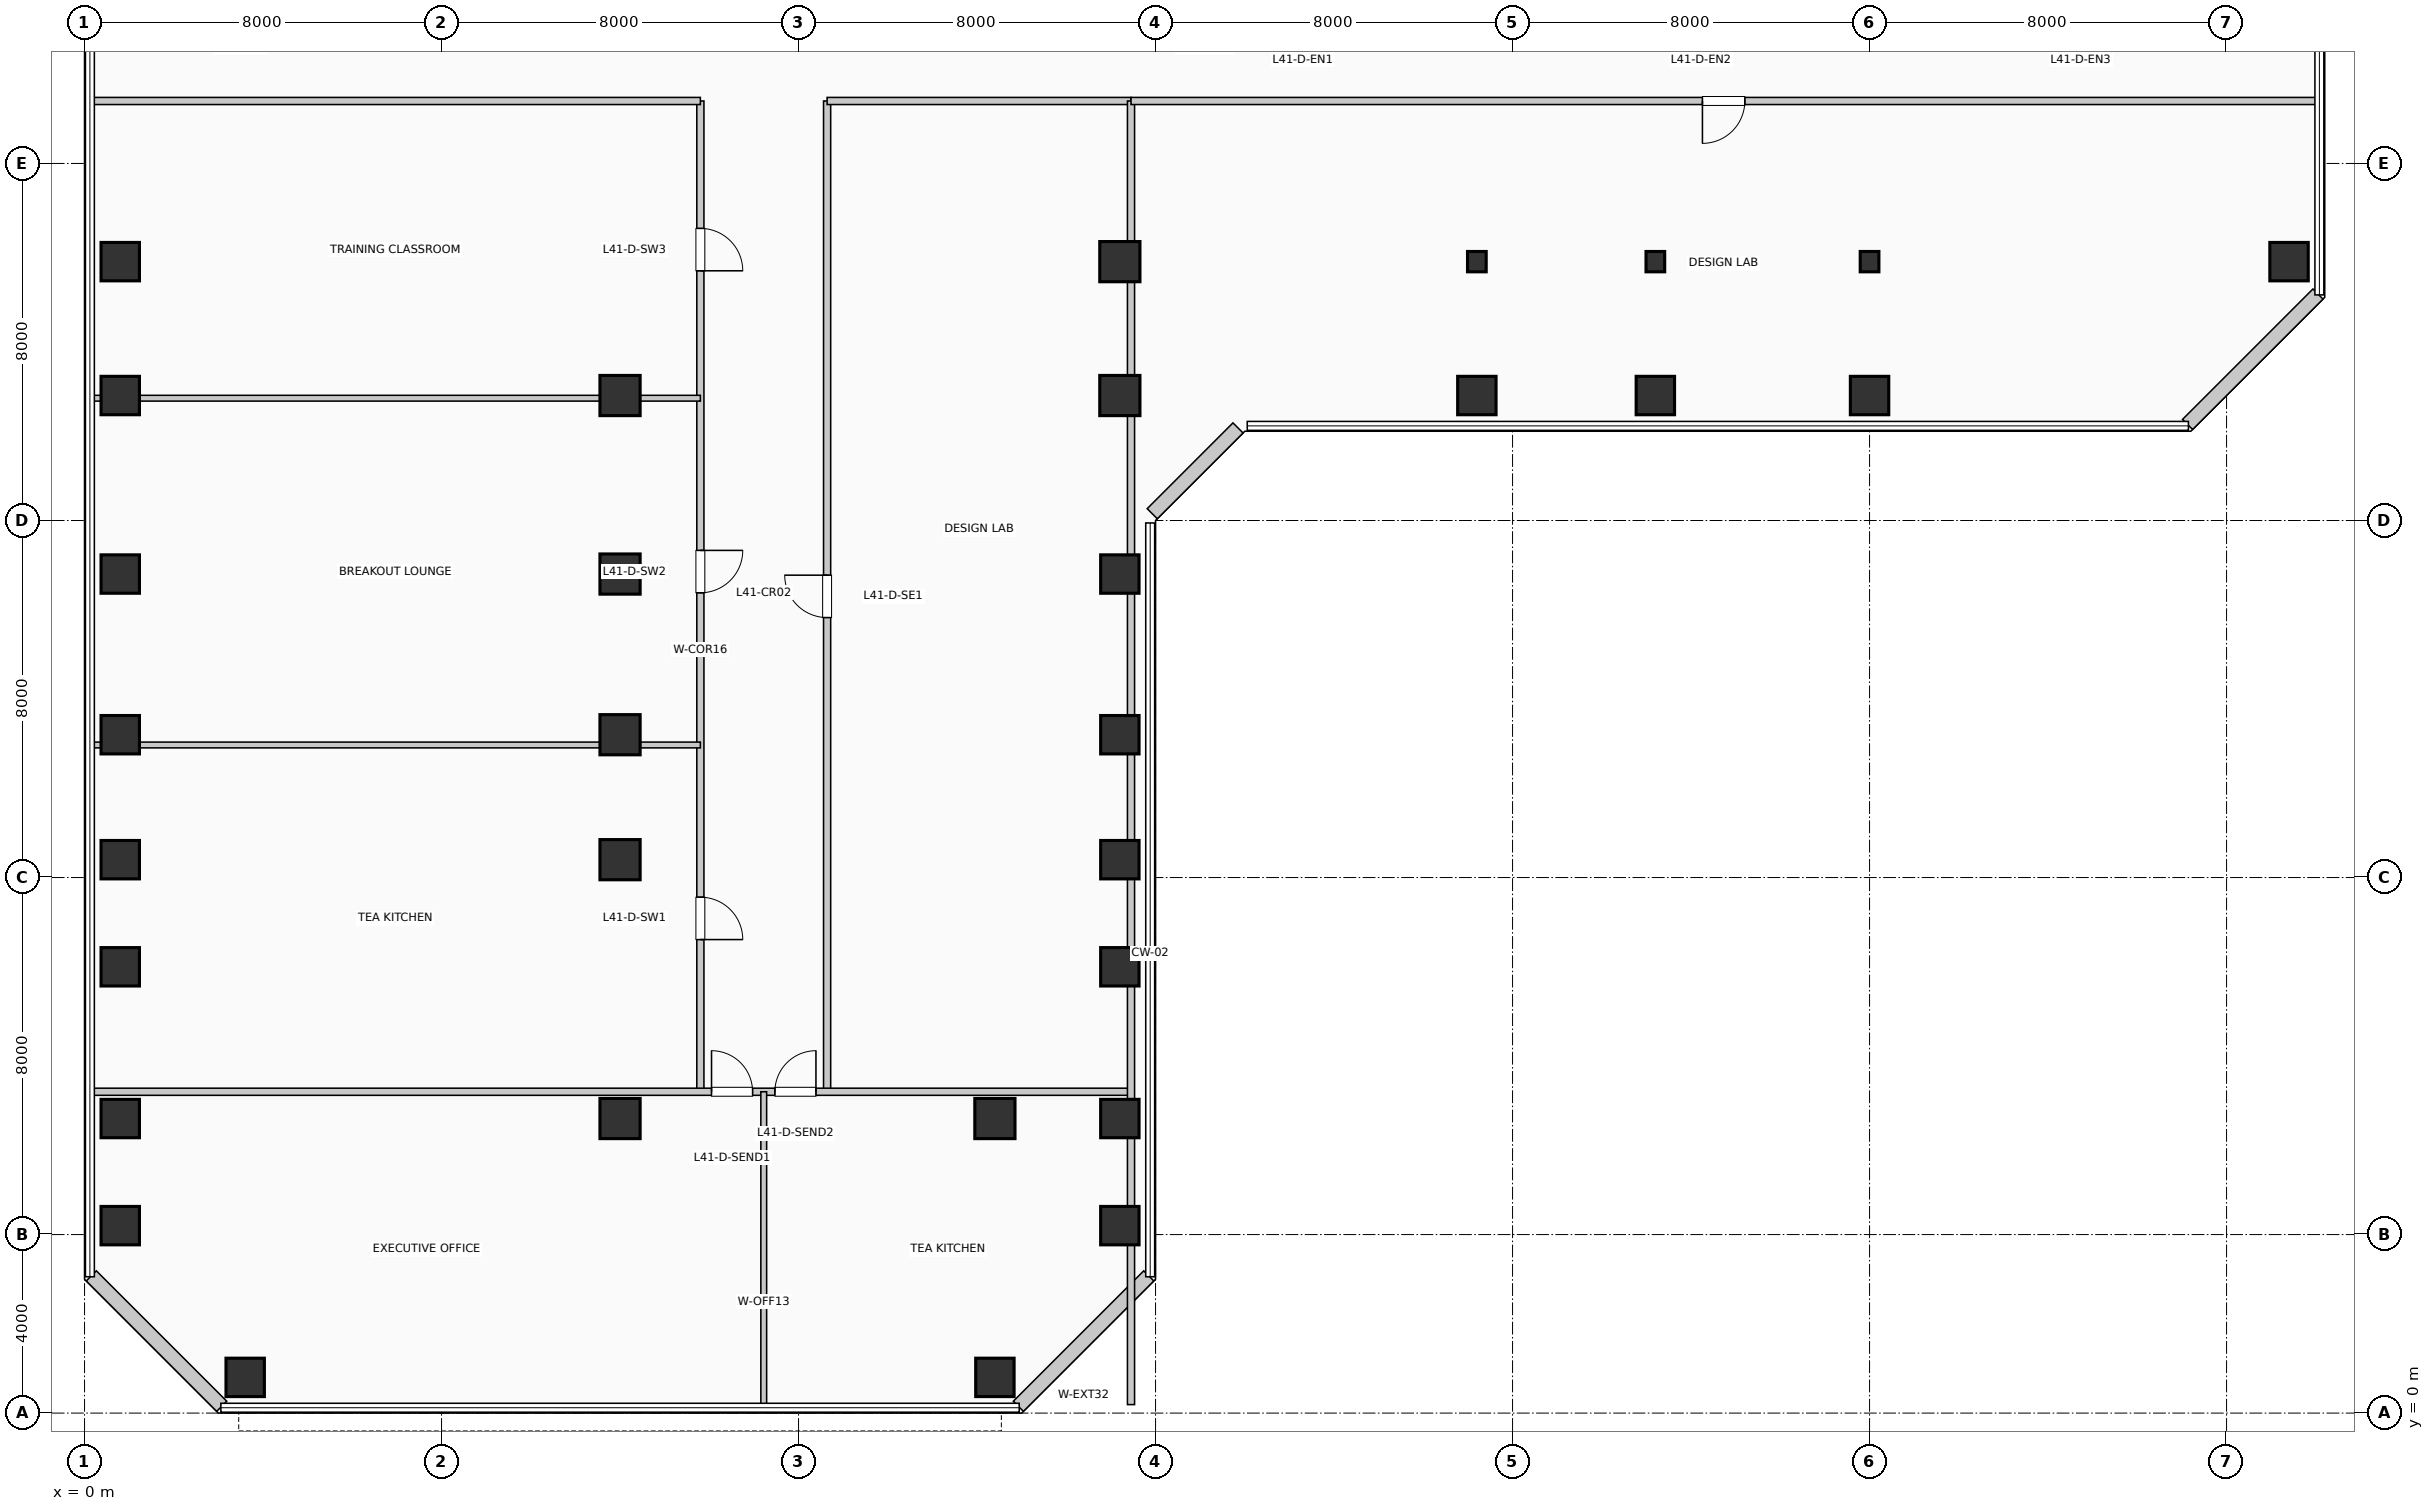
"""IFC4 building model, lengths in metres.
Left out: names, types, materials, properties, quantities, classifications, styles, units other than length and angle.
Written with IfcOpenShell. Run it as: python <this file> out.ifc"""

import sys

from ifc_helpers import new_model, si_unit, direction, frame, frame_2d, origin, origin_2d, place, context, subcontext, project, spatial, rectangle, i_section, extrude, element, fill, save


model = new_model("IFC4")
c1 = context("Model", 3, precision=1e-05, world=origin(), true_north=direction((0.0, 1.0)))
c2 = subcontext(c1, "Body", "Model", "MODEL_VIEW")
j1 = project(units=[si_unit("LENGTHUNIT", "METRE"), si_unit("PLANEANGLEUNIT", "RADIAN")], contexts=[c1])
p1 = place(None, origin())
s1 = spatial("IfcSite", under=j1, at=p1, CompositionType="ELEMENT")
p2 = place(p1, origin())
s2 = spatial("IfcBuilding", under=s1, at=p2, CompositionType="ELEMENT")
p3 = place(p2, frame((0.0, 0.0, 170.61)))
s3 = spatial("IfcBuildingStorey", under=s2, at=p3, CompositionType="ELEMENT", Elevation=170.61)
for number, where, z_axis, x_axis in (
    (1, (0.8, 4.2, 0.0), (0.0, 0.0, 1.0), (1.0, 0.0, 0.0)),
    (2, (0.8, 6.6, 0.0), (0.0, 0.0, 1.0), (1.0, 0.0, 0.0)),
    (3, (0.8, 10.0, 0.0), (0.0, 0.0, 1.0), (1.0, 0.0, 0.0)),
    (4, (0.8, 12.4, 0.0), (0.0, 0.0, 1.0), (1.0, 0.0, 0.0)),
    (5, (0.8, 15.2, 0.0), (0.0, 0.0, 1.0), (1.0, 0.0, 0.0)),
    (6, (0.8, 18.8, 0.0), (0.0, 0.0, 1.0), (1.0, 0.0, 0.0)),
    (7, (0.8, 22.8, 0.0), (0.0, 0.0, 1.0), (1.0, 0.0, 0.0)),
    (8, (0.8, 25.8, 0.0), (0.0, 0.0, 1.0), (1.0, 0.0, 0.0)),
    (9, (3.6, 0.8, 0.0), (0.0, 0.0, 1.0), (1.0, 0.0, 0.0)),
):
    element("IfcColumn", number, at=place(p3, frame(where, z_axis=z_axis, x_axis=x_axis)), inside=s3, PredefinedType="COLUMN", context=c2, shape_type="SweptSolid", body=[
        extrude(rectangle(XDim=0.86, YDim=0.86, at=origin_2d()), origin(), (0.0, 0.0, 1.0), 3.96),
    ])
for number, where, z_axis, x_axis in (
    (10, (12.0, 6.6, 0.0), (0.0, 0.0, 1.0), (1.0, 0.0, 0.0)),
    (11, (12.0, 12.4, 0.0), (0.0, 0.0, 1.0), (1.0, 0.0, 0.0)),
    (12, (12.0, 15.2, 0.0), (0.0, 0.0, 1.0), (1.0, 0.0, 0.0)),
    (13, (12.0, 18.8, 0.0), (0.0, 0.0, 1.0), (1.0, 0.0, 0.0)),
    (14, (12.0, 22.8, 0.0), (0.0, 0.0, 1.0), (1.0, 0.0, 0.0)),
):
    element("IfcColumn", number, at=place(p3, frame(where, z_axis=z_axis, x_axis=x_axis)), inside=s3, PredefinedType="COLUMN", context=c2, shape_type="SweptSolid", body=[
        extrude(rectangle(XDim=0.9, YDim=0.9, at=origin_2d()), origin(), (0.0, 0.0, 1.0), 3.96),
    ])
p4 = place(p3, frame((20.4, 0.8, 0.0), z_axis=(0.0, 0.0, 1.0), x_axis=(1.0, 0.0, 0.0)))
e15 = element("IfcColumn", 15, at=p4, inside=s3, PredefinedType="COLUMN", context=c2, shape_type="SweptSolid", body=[
    extrude(rectangle(XDim=0.86, YDim=0.86, at=origin_2d()), origin(), (0.0, 0.0, 1.0), 3.96),
])
p5 = place(p3, frame((20.4, 6.6, 0.0), z_axis=(0.0, 0.0, 1.0), x_axis=(1.0, 0.0, 0.0)))
e16 = element("IfcColumn", 16, at=p5, inside=s3, PredefinedType="COLUMN", context=c2, shape_type="SweptSolid", body=[
    extrude(rectangle(XDim=0.9, YDim=0.9, at=origin_2d()), origin(), (0.0, 0.0, 1.0), 3.96),
])
for number, where, z_axis, x_axis in (
    (17, (23.2, 4.2, 0.0), (0.0, 0.0, 1.0), (1.0, 0.0, 0.0)),
    (18, (23.2, 6.6, 0.0), (0.0, 0.0, 1.0), (1.0, 0.0, 0.0)),
    (19, (23.2, 10.0, 0.0), (0.0, 0.0, 1.0), (1.0, 0.0, 0.0)),
    (20, (23.2, 12.4, 0.0), (0.0, 0.0, 1.0), (1.0, 0.0, 0.0)),
    (21, (23.2, 15.2, 0.0), (0.0, 0.0, 1.0), (1.0, 0.0, 0.0)),
    (22, (23.2, 18.8, 0.0), (0.0, 0.0, 1.0), (1.0, 0.0, 0.0)),
):
    element("IfcColumn", number, at=place(p3, frame(where, z_axis=z_axis, x_axis=x_axis)), inside=s3, PredefinedType="COLUMN", context=c2, shape_type="SweptSolid", body=[
        extrude(rectangle(XDim=0.86, YDim=0.86, at=origin_2d()), origin(), (0.0, 0.0, 1.0), 3.96),
    ])
for number, where, z_axis, x_axis in (
    (23, (23.2, 22.8, 0.0), (0.0, 0.0, 1.0), (1.0, 0.0, 0.0)),
    (24, (23.2, 25.8, 0.0), (0.0, 0.0, 1.0), (1.0, 0.0, 0.0)),
):
    element("IfcColumn", number, at=place(p3, frame(where, z_axis=z_axis, x_axis=x_axis)), inside=s3, PredefinedType="COLUMN", context=c2, shape_type="SweptSolid", body=[
        extrude(rectangle(XDim=0.9, YDim=0.9, at=origin_2d()), origin(), (0.0, 0.0, 1.0), 3.96),
    ])
p6 = place(p3, frame((31.2, 22.8, 0.0), z_axis=(0.0, 0.0, 1.0), x_axis=(1.0, 0.0, 0.0)))
e25 = element("IfcColumn", 25, at=p6, inside=s3, PredefinedType="COLUMN", context=c2, shape_type="SweptSolid", body=[
    extrude(rectangle(XDim=0.86, YDim=0.86, at=origin_2d()), origin(), (0.0, 0.0, 1.0), 3.96),
])
p7 = place(p3, frame((31.2, 25.8, 0.0), z_axis=(0.0, 0.0, 1.0), x_axis=(1.0, 0.0, 0.0)))
e26 = element("IfcColumn", 26, at=p7, inside=s3, PredefinedType="COLUMN", context=c2, shape_type="SweptSolid", body=[
    extrude(i_section(OverallWidth=0.418, OverallDepth=0.455, WebThickness=0.032, FlangeThickness=0.051, at=origin_2d()), origin(), (0.0, 0.0, 1.0), 3.96),
])
p8 = place(p3, frame((35.2, 22.8, 0.0), z_axis=(0.0, 0.0, 1.0), x_axis=(1.0, 0.0, 0.0)))
e27 = element("IfcColumn", 27, at=p8, inside=s3, PredefinedType="COLUMN", context=c2, shape_type="SweptSolid", body=[
    extrude(rectangle(XDim=0.86, YDim=0.86, at=origin_2d()), origin(), (0.0, 0.0, 1.0), 3.96),
])
p9 = place(p3, frame((35.2, 25.8, 0.0), z_axis=(0.0, 0.0, 1.0), x_axis=(1.0, 0.0, 0.0)))
e28 = element("IfcColumn", 28, at=p9, inside=s3, PredefinedType="COLUMN", context=c2, shape_type="SweptSolid", body=[
    extrude(i_section(OverallWidth=0.418, OverallDepth=0.455, WebThickness=0.032, FlangeThickness=0.051, at=origin_2d()), origin(), (0.0, 0.0, 1.0), 3.96),
])
p10 = place(p3, frame((40.0, 22.8, 0.0), z_axis=(0.0, 0.0, 1.0), x_axis=(1.0, 0.0, 0.0)))
e29 = element("IfcColumn", 29, at=p10, inside=s3, PredefinedType="COLUMN", context=c2, shape_type="SweptSolid", body=[
    extrude(rectangle(XDim=0.86, YDim=0.86, at=origin_2d()), origin(), (0.0, 0.0, 1.0), 3.96),
])
p11 = place(p3, frame((40.0, 25.8, 0.0), z_axis=(0.0, 0.0, 1.0), x_axis=(1.0, 0.0, 0.0)))
e30 = element("IfcColumn", 30, at=p11, inside=s3, PredefinedType="COLUMN", context=c2, shape_type="SweptSolid", body=[
    extrude(i_section(OverallWidth=0.418, OverallDepth=0.455, WebThickness=0.032, FlangeThickness=0.051, at=origin_2d()), origin(), (0.0, 0.0, 1.0), 3.96),
])
p12 = place(p3, frame((49.4, 25.8, 0.0), z_axis=(0.0, 0.0, 1.0), x_axis=(1.0, 0.0, 0.0)))
e31 = element("IfcColumn", 31, at=p12, inside=s3, PredefinedType="COLUMN", context=c2, shape_type="SweptSolid", body=[
    extrude(rectangle(XDim=0.86, YDim=0.86, at=origin_2d()), origin(), (0.0, 0.0, 1.0), 3.96),
])
p13 = place(p3, frame((20.926, 0.152, 0.0), z_axis=(0.0, 0.0, 1.0), x_axis=(0.707106781187, 0.707106781187, 0.0)))
e32 = element("IfcWall", 32, at=p13, inside=s3, PredefinedType="SOLIDWALL", context=c2, shape_type="SweptSolid", body=[
    extrude(rectangle(XDim=4.133, YDim=0.32, at=frame_2d((2.066, 0.0))), origin(), (0.0, 0.0, 1.0), 3.61),
])
p14 = place(p3, frame((23.926, 20.152, 0.0), z_axis=(0.0, 0.0, 1.0), x_axis=(0.707106781187, 0.707106781187, 0.0)))
e33 = element("IfcWall", 33, at=p14, inside=s3, PredefinedType="SOLIDWALL", context=c2, shape_type="SweptSolid", body=[
    extrude(rectangle(XDim=2.718, YDim=0.32, at=frame_2d((1.359, 0.0))), origin(), (0.0, 0.0, 1.0), 3.61),
])
for number, where, z_axis, x_axis in (
    (34, (47.126, 22.152, 0.0), (0.0, 0.0, 1.0), (0.707, 0.707, 0.0)),
    (35, (0.152, 3.074, 0.0), (0.0, 0.0, 1.0), (0.707, -0.707, 0.0)),
):
    element("IfcWall", number, at=place(p3, frame(where, z_axis=z_axis, x_axis=x_axis)), inside=s3, PredefinedType="SOLIDWALL", context=c2, shape_type="SweptSolid", body=[
        extrude(rectangle(XDim=4.133, YDim=0.32, at=frame_2d((2.066, 0.0))), origin(), (0.0, 0.0, 1.0), 3.61),
    ])
p15 = place(p3, frame((13.8, 7.2, 0.0), z_axis=(0.0, 0.0, 1.0), x_axis=(0.0, 1.0, 0.0)))
e36 = element("IfcWall", 36, at=p15, inside=s3, PredefinedType="PARTITIONING", context=c2, shape_type="SweptSolid", body=[
    extrude(rectangle(XDim=22.2, YDim=0.16, at=frame_2d((11.1, 0.0))), origin(), (0.0, 0.0, 1.0), 3.61),
])
p16 = place(p15, frame((4.36, 0.0, 0.0), z_axis=(0.0, 0.0, 1.0), x_axis=(-1.0, 0.0, 0.0)))
e37 = element("IfcOpeningElement", 37, at=p16, cuts=e36, PredefinedType="OPENING", context=c2, shape_type="SweptSolid", body=[
    extrude(rectangle(XDim=0.95, YDim=2.15, at=frame_2d((0.475, 1.075))), frame((0.0, 0.09, 0.0), z_axis=(0.0, -1.0, 0.0), x_axis=(1.0, 0.0, 0.0)), (0.0, 0.0, 1.0), 0.18),
])
p17 = place(p15, frame((12.13, 0.0, 0.0), z_axis=(0.0, 0.0, 1.0), x_axis=(-1.0, 0.0, 0.0)))
e38 = element("IfcOpeningElement", 38, at=p17, cuts=e36, PredefinedType="OPENING", context=c2, shape_type="SweptSolid", body=[
    extrude(rectangle(XDim=0.95, YDim=2.15, at=frame_2d((0.475, 1.075))), frame((0.0, 0.09, 0.0), z_axis=(0.0, -1.0, 0.0), x_axis=(1.0, 0.0, 0.0)), (0.0, 0.0, 1.0), 0.18),
])
p18 = place(p15, frame((19.345, 0.0, 0.0), z_axis=(0.0, 0.0, 1.0), x_axis=(-1.0, 0.0, 0.0)))
e39 = element("IfcOpeningElement", 39, at=p18, cuts=e36, PredefinedType="OPENING", context=c2, shape_type="SweptSolid", body=[
    extrude(rectangle(XDim=0.95, YDim=2.15, at=frame_2d((0.475, 1.075))), frame((0.0, 0.09, 0.0), z_axis=(0.0, -1.0, 0.0), x_axis=(1.0, 0.0, 0.0)), (0.0, 0.0, 1.0), 0.18),
])
p19 = place(p3, frame((16.64, 7.2, 0.0), z_axis=(0.0, 0.0, 1.0), x_axis=(0.0, 1.0, 0.0)))
e40 = element("IfcWall", 40, at=p19, inside=s3, PredefinedType="PARTITIONING", context=c2, shape_type="SweptSolid", body=[
    extrude(rectangle(XDim=22.2, YDim=0.16, at=frame_2d((11.1, 0.0))), origin(), (0.0, 0.0, 1.0), 3.61),
])
p20 = place(p19, frame((10.625, 0.0, 0.0)))
e41 = element("IfcOpeningElement", 41, at=p20, cuts=e40, PredefinedType="OPENING", context=c2, shape_type="SweptSolid", body=[
    extrude(rectangle(XDim=0.95, YDim=2.15, at=frame_2d((0.475, 1.075))), frame((0.0, 0.09, 0.0), z_axis=(0.0, -1.0, 0.0), x_axis=(1.0, 0.0, 0.0)), (0.0, 0.0, 1.0), 0.18),
])
p21 = place(p3, frame((0.19, 7.2, 0.0), z_axis=(0.0, 0.0, 1.0), x_axis=(1.0, 0.0, 0.0)))
e42 = element("IfcWall", 42, at=p21, inside=s3, PredefinedType="PARTITIONING", context=c2, shape_type="SweptSolid", body=[
    extrude(rectangle(XDim=23.26, YDim=0.16, at=frame_2d((11.63, 0.0))), origin(), (0.0, 0.0, 1.0), 3.61),
])
p22 = place(p21, frame((13.86, 0.0, 0.0)))
e43 = element("IfcOpeningElement", 43, at=p22, cuts=e42, PredefinedType="OPENING", context=c2, shape_type="SweptSolid", body=[
    extrude(rectangle(XDim=0.92, YDim=2.1, at=frame_2d((0.46, 1.05))), frame((0.0, 0.09, 0.0), z_axis=(0.0, -1.0, 0.0), x_axis=(1.0, 0.0, 0.0)), (0.0, 0.0, 1.0), 0.18),
])
p23 = place(p21, frame((15.28, 0.0, 0.0)))
e44 = element("IfcOpeningElement", 44, at=p23, cuts=e42, PredefinedType="OPENING", context=c2, shape_type="SweptSolid", body=[
    extrude(rectangle(XDim=0.92, YDim=2.1, at=frame_2d((0.46, 1.05))), frame((0.0, 0.09, 0.0), z_axis=(0.0, -1.0, 0.0), x_axis=(1.0, 0.0, 0.0)), (0.0, 0.0, 1.0), 0.18),
])
p24 = place(p3, frame((0.19, 29.4, 0.0), z_axis=(0.0, 0.0, 1.0), x_axis=(1.0, 0.0, 0.0)))
e45 = element("IfcWall", 45, at=p24, inside=s3, PredefinedType="PARTITIONING", context=c2, shape_type="SweptSolid", body=[
    extrude(rectangle(XDim=13.61, YDim=0.16, at=frame_2d((6.805, 0.0))), origin(), (0.0, 0.0, 1.0), 3.265),
])
p25 = place(p3, frame((16.64, 29.4, 0.0), z_axis=(0.0, 0.0, 1.0), x_axis=(1.0, 0.0, 0.0)))
e46 = element("IfcWall", 46, at=p25, inside=s3, PredefinedType="PARTITIONING", context=c2, shape_type="SweptSolid", body=[
    extrude(rectangle(XDim=6.81, YDim=0.16, at=frame_2d((3.405, 0.0))), origin(), (0.0, 0.0, 1.0), 3.61),
])
p26 = place(p3, frame((23.45, 0.19, 0.0), z_axis=(0.0, 0.0, 1.0), x_axis=(0.0, 1.0, 0.0)))
e47 = element("IfcWall", 47, at=p26, inside=s3, PredefinedType="PARTITIONING", context=c2, shape_type="SweptSolid", body=[
    extrude(rectangle(XDim=29.21, YDim=0.16, at=frame_2d((14.605, 0.0))), origin(), (0.0, 0.0, 1.0), 2.945),
])
p27 = place(p3, frame((15.22, 0.19, 0.0), z_axis=(0.0, 0.0, 1.0), x_axis=(0.0, 1.0, 0.0)))
e48 = element("IfcWall", 48, at=p27, inside=s3, PredefinedType="PARTITIONING", context=c2, shape_type="SweptSolid", body=[
    extrude(rectangle(XDim=7.01, YDim=0.13, at=frame_2d((3.505, 0.0))), origin(), (0.0, 0.0, 1.0), 3.61),
])
for number, where, z_axis, x_axis in (
    (49, (0.19, 14.97, 0.0), (0.0, 0.0, 1.0), (1.0, 0.0, 0.0)),
    (50, (0.19, 22.74, 0.0), (0.0, 0.0, 1.0), (1.0, 0.0, 0.0)),
):
    element("IfcWall", number, at=place(p3, frame(where, z_axis=z_axis, x_axis=x_axis)), inside=s3, PredefinedType="PARTITIONING", context=c2, shape_type="SweptSolid", body=[
        extrude(rectangle(XDim=13.61, YDim=0.13, at=frame_2d((6.805, 0.0))), origin(), (0.0, 0.0, 1.0), 2.945),
    ])
p28 = place(p3, frame((23.45, 29.4, 0.0), z_axis=(0.0, 0.0, 1.0), x_axis=(1.0, 0.0, 0.0)))
e51 = element("IfcWall", 51, at=p28, inside=s3, PredefinedType="PARTITIONING", context=c2, shape_type="SweptSolid", body=[
    extrude(rectangle(XDim=26.56, YDim=0.16, at=frame_2d((13.28, 0.0))), origin(), (0.0, 0.0, 1.0), 3.265),
])
p29 = place(p28, frame((13.755, 0.0, 0.0), z_axis=(0.0, 0.0, 1.0), x_axis=(-1.0, 0.0, 0.0)))
e52 = element("IfcOpeningElement", 52, at=p29, cuts=e51, PredefinedType="OPENING", context=c2, shape_type="SweptSolid", body=[
    extrude(rectangle(XDim=0.95, YDim=2.15, at=frame_2d((0.475, 1.075))), frame((0.0, 0.09, 0.0), z_axis=(0.0, -1.0, 0.0), x_axis=(1.0, 0.0, 0.0)), (0.0, 0.0, 1.0), 0.18),
])
p30 = place(p22, origin())
e53 = element("IfcDoor", 53, at=p30, inside=s3, OperationType="SINGLE_SWING_LEFT", PredefinedType="DOOR", context=c2, shape_type="SweptSolid", body=[
    extrude(rectangle(XDim=0.92, YDim=2.1, at=frame_2d((0.46, 1.05))), frame((0.0, 0.025, 0.0), z_axis=(0.0, -1.0, 0.0), x_axis=(1.0, 0.0, 0.0)), (0.0, 0.0, 1.0), 0.05),
])
fill(e43, e53)
p31 = place(p23, origin())
e54 = element("IfcDoor", 54, at=p31, inside=s3, OperationType="SINGLE_SWING_RIGHT", PredefinedType="DOOR", context=c2, shape_type="SweptSolid", body=[
    extrude(rectangle(XDim=0.92, YDim=2.1, at=frame_2d((0.46, 1.05))), frame((0.0, 0.025, 0.0), z_axis=(0.0, -1.0, 0.0), x_axis=(1.0, 0.0, 0.0)), (0.0, 0.0, 1.0), 0.05),
])
fill(e44, e54)
p32 = place(p16, origin())
e55 = element("IfcDoor", 55, at=p32, inside=s3, OperationType="SINGLE_SWING_LEFT", PredefinedType="DOOR", context=c2, shape_type="SweptSolid", body=[
    extrude(rectangle(XDim=0.95, YDim=2.15, at=frame_2d((0.475, 1.075))), frame((0.0, 0.025, 0.0), z_axis=(0.0, -1.0, 0.0), x_axis=(1.0, 0.0, 0.0)), (0.0, 0.0, 1.0), 0.05),
])
fill(e37, e55)
p33 = place(p17, origin())
e56 = element("IfcDoor", 56, at=p33, inside=s3, OperationType="SINGLE_SWING_RIGHT", PredefinedType="DOOR", context=c2, shape_type="SweptSolid", body=[
    extrude(rectangle(XDim=0.95, YDim=2.15, at=frame_2d((0.475, 1.075))), frame((0.0, 0.025, 0.0), z_axis=(0.0, -1.0, 0.0), x_axis=(1.0, 0.0, 0.0)), (0.0, 0.0, 1.0), 0.05),
])
fill(e38, e56)
p34 = place(p18, origin())
e57 = element("IfcDoor", 57, at=p34, inside=s3, OperationType="SINGLE_SWING_LEFT", PredefinedType="DOOR", context=c2, shape_type="SweptSolid", body=[
    extrude(rectangle(XDim=0.95, YDim=2.15, at=frame_2d((0.475, 1.075))), frame((0.0, 0.025, 0.0), z_axis=(0.0, -1.0, 0.0), x_axis=(1.0, 0.0, 0.0)), (0.0, 0.0, 1.0), 0.05),
])
fill(e39, e57)
p35 = place(p20, origin())
e58 = element("IfcDoor", 58, at=p35, inside=s3, OperationType="SINGLE_SWING_RIGHT", PredefinedType="DOOR", context=c2, shape_type="SweptSolid", body=[
    extrude(rectangle(XDim=0.95, YDim=2.15, at=frame_2d((0.475, 1.075))), frame((0.0, 0.025, 0.0), z_axis=(0.0, -1.0, 0.0), x_axis=(1.0, 0.0, 0.0)), (0.0, 0.0, 1.0), 0.05),
])
fill(e41, e58)
p36 = place(p29, origin())
e59 = element("IfcDoor", 59, at=p36, inside=s3, OperationType="SINGLE_SWING_LEFT", PredefinedType="DOOR", context=c2, shape_type="SweptSolid", body=[
    extrude(rectangle(XDim=0.95, YDim=2.15, at=frame_2d((0.475, 1.075))), frame((0.0, 0.025, 0.0), z_axis=(0.0, -1.0, 0.0), x_axis=(1.0, 0.0, 0.0)), (0.0, 0.0, 1.0), 0.05),
])
fill(e52, e59)
save(model, sys.argv[1])
